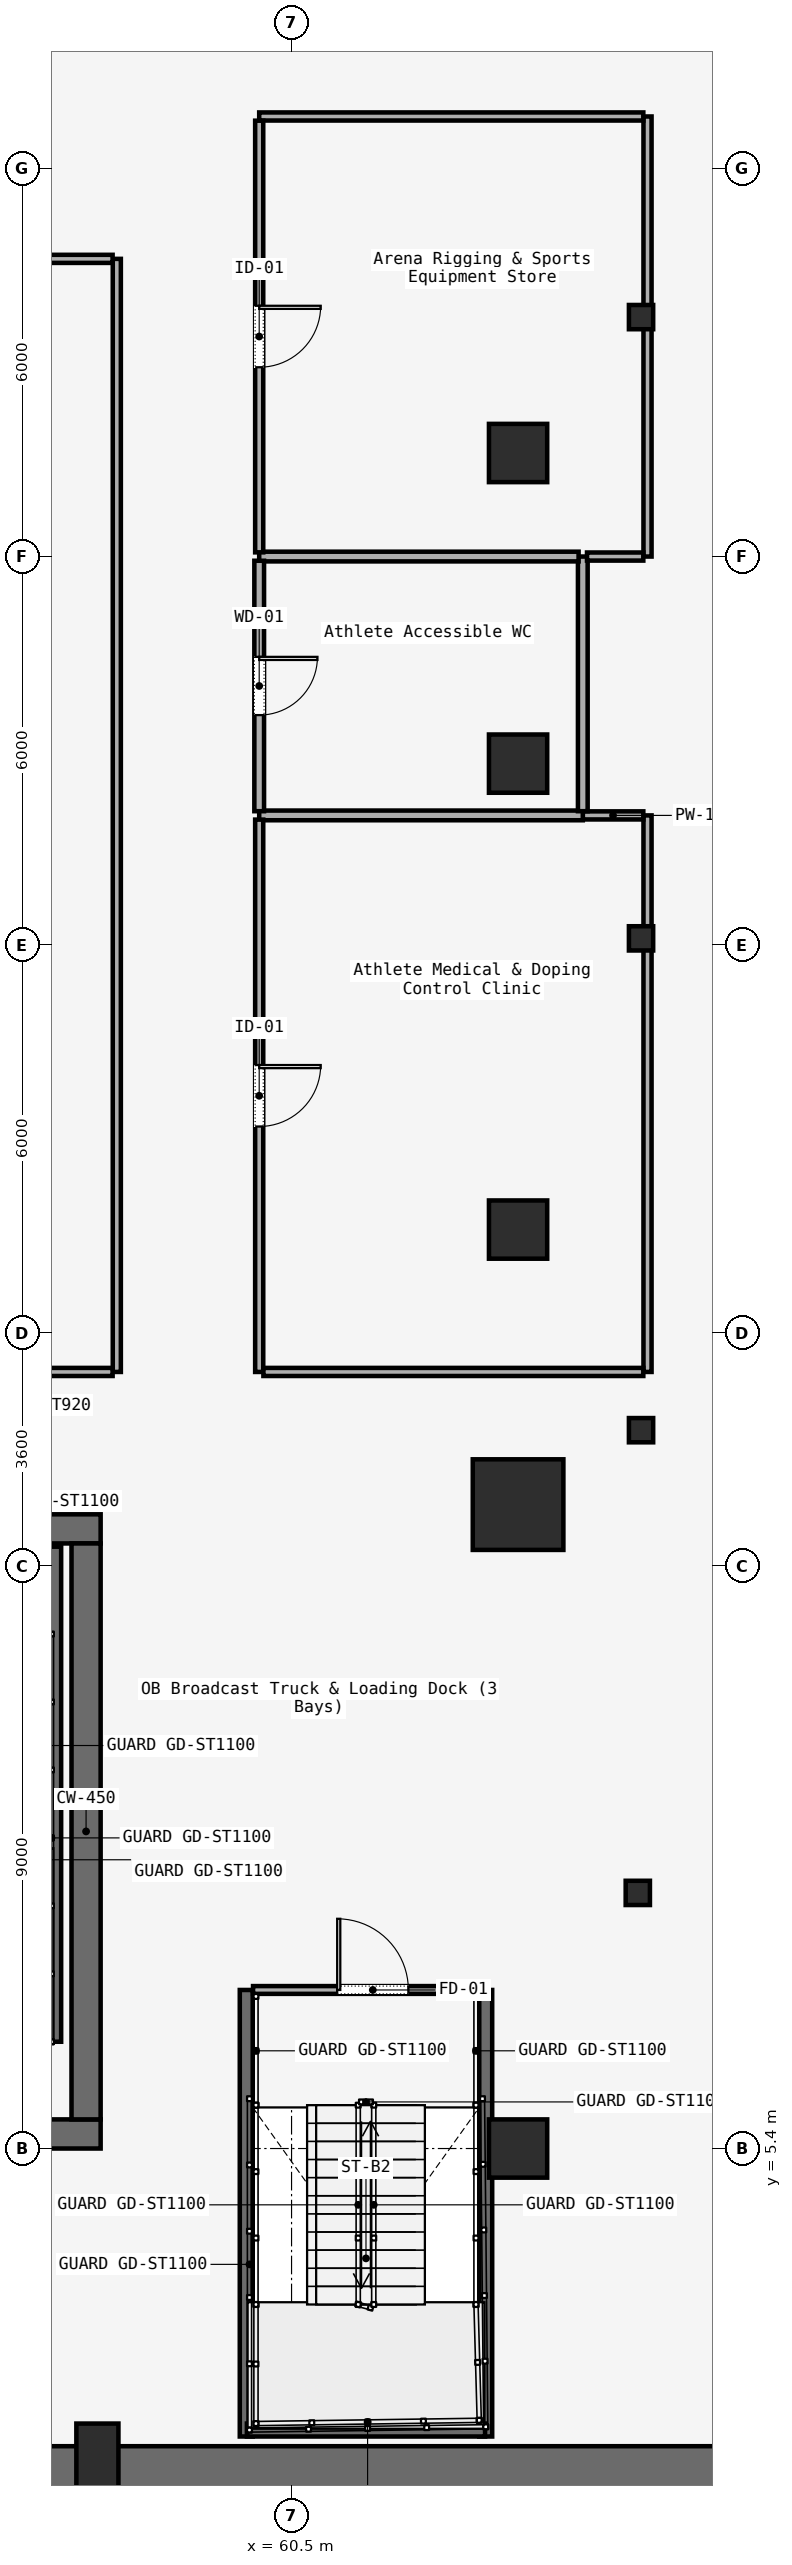
"""IFC4 building model, lengths in metres.
Left out: names, types, materials, properties, quantities, classifications, styles, units other than length and angle.
Written with IfcOpenShell. Run it as: python <this file> out.ifc"""

import sys

from ifc_helpers import new_model, si_unit, direction, frame, frame_2d, origin, origin_2d, place, context, subcontext, project, spatial, rectangle, i_section, extrude, element, fill, save


model = new_model("IFC4")
c1 = context("Model", 3, precision=1e-05, world=origin(), true_north=direction((0.0, 1.0)))
c2 = subcontext(c1, "Body", "Model", "MODEL_VIEW")
j1 = project(units=[si_unit("LENGTHUNIT", "METRE"), si_unit("PLANEANGLEUNIT", "RADIAN")], contexts=[c1])
p1 = place(None, origin())
s1 = spatial("IfcSite", under=j1, at=p1, CompositionType="ELEMENT")
p2 = place(p1, origin())
s2 = spatial("IfcBuilding", under=s1, at=p2, CompositionType="ELEMENT")
p3 = place(p2, frame((0.0, 0.0, -4.5)))
s3 = spatial("IfcBuildingStorey", under=s2, at=p3, CompositionType="ELEMENT", Elevation=-4.5)
p4 = place(p3, frame((0.0, 0.4, 0.0), z_axis=(0.0, 0.0, 1.0), x_axis=(1.0, 0.0, 0.0)))
e1 = element("IfcWall", 1, at=p4, inside=s3, PredefinedType="USERDEFINED", context=c2, shape_type="SweptSolid", body=[
    extrude(rectangle(XDim=84.0, YDim=0.8, at=frame_2d((42.0, 0.0))), origin(), (0.0, 0.0, 1.0), 4.1),
])
p5 = place(p3, frame((26.45, 14.975, 0.0), z_axis=(0.0, 0.0, 1.0), x_axis=(1.0, 0.0, 0.0)))
e2 = element("IfcWall", 2, at=p5, inside=s3, PredefinedType="SOLIDWALL", context=c2, shape_type="SweptSolid", body=[
    extrude(rectangle(XDim=31.1, YDim=0.45, at=frame_2d((15.55, 0.0))), origin(), (0.0, 0.0, 1.0), 4.1),
])
p6 = place(p5, frame((1.65, 0.0, 0.0)))
e3 = element("IfcOpeningElement", 3, at=p6, cuts=e2, PredefinedType="OPENING", context=c2, shape_type="SweptSolid", body=[
    extrude(rectangle(XDim=1.1, YDim=2.2, at=frame_2d((0.55, 1.1))), frame((0.0, 0.225, 0.0), z_axis=(0.0, -1.0, 0.0), x_axis=(1.0, 0.0, 0.0)), (0.0, 0.0, 1.0), 0.45),
])
p7 = place(p5, frame((13.65, 0.0, 0.0)))
e4 = element("IfcOpeningElement", 4, at=p7, cuts=e2, PredefinedType="OPENING", context=c2, shape_type="SweptSolid", body=[
    extrude(rectangle(XDim=1.1, YDim=2.2, at=frame_2d((0.55, 1.1))), frame((0.0, 0.225, 0.0), z_axis=(0.0, -1.0, 0.0), x_axis=(1.0, 0.0, 0.0)), (0.0, 0.0, 1.0), 0.45),
])
p8 = place(p5, frame((25.55, 0.0, 0.0)))
e5 = element("IfcOpeningElement", 5, at=p8, cuts=e2, PredefinedType="OPENING", context=c2, shape_type="SweptSolid", body=[
    extrude(rectangle(XDim=1.1, YDim=2.2, at=frame_2d((0.55, 1.1))), frame((0.0, 0.225, 0.0), z_axis=(0.0, -1.0, 0.0), x_axis=(1.0, 0.0, 0.0)), (0.0, 0.0, 1.0), 0.45),
])
p9 = place(p5, frame((10.7, 0.0, 0.0)))
e6 = element("IfcOpeningElement", 6, at=p9, cuts=e2, PredefinedType="OPENING", context=c2, shape_type="SweptSolid", body=[
    extrude(rectangle(XDim=1.4, YDim=2.2, at=frame_2d((0.7, 1.1))), frame((0.0, 0.225, 0.0), z_axis=(0.0, -1.0, 0.0), x_axis=(1.0, 0.0, 0.0)), (0.0, 0.0, 1.0), 0.45),
])
p10 = place(p5, frame((19.35, 0.0, 0.0)))
e7 = element("IfcOpeningElement", 7, at=p10, cuts=e2, PredefinedType="OPENING", context=c2, shape_type="SweptSolid", body=[
    extrude(rectangle(XDim=1.1, YDim=2.2, at=frame_2d((0.55, 1.1))), frame((0.0, 0.225, 0.0), z_axis=(0.0, -1.0, 0.0), x_axis=(1.0, 0.0, 0.0)), (0.0, 0.0, 1.0), 0.45),
])
p11 = place(p5, frame((21.4, 0.0, 0.0)))
e8 = element("IfcOpeningElement", 8, at=p11, cuts=e2, PredefinedType="OPENING", context=c2, shape_type="SweptSolid", body=[
    extrude(rectangle(XDim=0.9, YDim=2.1, at=frame_2d((0.45, 1.05))), frame((0.0, 0.225, 0.0), z_axis=(0.0, -1.0, 0.0), x_axis=(1.0, 0.0, 0.0)), (0.0, 0.0, 1.0), 0.45),
])
p12 = place(p5, frame((23.35, 0.0, 0.0)))
e9 = element("IfcOpeningElement", 9, at=p12, cuts=e2, PredefinedType="OPENING", context=c2, shape_type="SweptSolid", body=[
    extrude(rectangle(XDim=1.3, YDim=2.3, at=frame_2d((0.65, 1.15))), frame((0.0, 0.225, 0.0), z_axis=(0.0, -1.0, 0.0), x_axis=(1.0, 0.0, 0.0)), (0.0, 0.0, 1.0), 0.45),
])
p13 = place(p3, frame((26.45, 5.625, 0.0), z_axis=(0.0, 0.0, 1.0), x_axis=(1.0, 0.0, 0.0)))
e10 = element("IfcWall", 10, at=p13, inside=s3, PredefinedType="SOLIDWALL", context=c2, shape_type="SweptSolid", body=[
    extrude(rectangle(XDim=31.1, YDim=0.45, at=frame_2d((15.55, 0.0))), origin(), (0.0, 0.0, 1.0), 4.1),
])
p14 = place(p3, frame((57.325, 5.85, 0.0), z_axis=(0.0, 0.0, 1.0), x_axis=(0.0, 1.0, 0.0)))
e11 = element("IfcWall", 11, at=p14, inside=s3, PredefinedType="SOLIDWALL", context=c2, shape_type="SweptSolid", body=[
    extrude(rectangle(XDim=8.9, YDim=0.45, at=frame_2d((4.45, 0.0))), origin(), (0.0, 0.0, 1.0), 4.1),
])
p15 = place(p3, frame((64.0, 15.35, 0.0), z_axis=(0.0, 0.0, 1.0), x_axis=(1.0, 0.0, 0.0)))
e12 = element("IfcColumn", 12, at=p15, inside=s3, PredefinedType="COLUMN", context=c2, shape_type="SweptSolid", body=[
    extrude(rectangle(XDim=1.4, YDim=1.4, at=origin_2d()), origin(), (0.0, 0.0, 1.0), 4.1),
])
p16 = place(p3, frame((57.5, 0.55, 0.0), z_axis=(0.0, 0.0, 1.0), x_axis=(1.0, 0.0, 0.0)))
e13 = element("IfcColumn", 13, at=p16, inside=s3, PredefinedType="PILASTER", context=c2, shape_type="SweptSolid", body=[
    extrude(rectangle(XDim=0.65, YDim=1.2, at=origin_2d()), origin(), (0.0, 0.0, 1.0), 4.1),
])
for number, where, z_axis, x_axis in (
    (14, (64.0, 5.4, 0.0), (0.0, 0.0, 1.0), (1.0, 0.0, 0.0)),
    (15, (64.0, 19.6, 0.0), (0.0, 0.0, 1.0), (1.0, 0.0, 0.0)),
    (16, (64.0, 26.8, 0.0), (0.0, 0.0, 1.0), (1.0, 0.0, 0.0)),
    (17, (64.0, 31.6, 0.0), (0.0, 0.0, 1.0), (1.0, 0.0, 0.0)),
):
    element("IfcColumn", number, at=place(p3, frame(where, z_axis=z_axis, x_axis=x_axis)), inside=s3, PredefinedType="COLUMN", context=c2, shape_type="SweptSolid", body=[
        extrude(rectangle(XDim=0.9, YDim=0.9, at=origin_2d()), origin(), (0.0, 0.0, 1.0), 4.1),
    ])
for number, where, z_axis, x_axis in (
    (18, (65.85, 9.35, 0.0), (0.0, 0.0, 1.0), (1.0, 0.0, 0.0)),
    (19, (65.9, 16.5, 0.0), (0.0, 0.0, 1.0), (1.0, 0.0, 0.0)),
    (20, (65.9, 24.1, 0.0), (0.0, 0.0, 1.0), (1.0, 0.0, 0.0)),
    (21, (65.9, 33.7, 0.0), (0.0, 0.0, 1.0), (1.0, 0.0, 0.0)),
):
    element("IfcColumn", number, at=place(p3, frame(where, z_axis=z_axis, x_axis=x_axis)), inside=s3, PredefinedType="COLUMN", context=c2, shape_type="SweptSolid", body=[
        extrude(i_section(OverallWidth=0.375, OverallDepth=0.375, WebThickness=0.017, FlangeThickness=0.027, FilletRadius=0.015, at=origin_2d()), origin(), (0.0, 0.0, 1.0), 4.1),
    ])
p17 = place(p3, frame((56.84, 14.7, 0.0), z_axis=(0.0, 0.0, 1.0), x_axis=(0.0, -1.0, 0.0)))
e22 = element("IfcWall", 22, at=p17, inside=s3, PredefinedType="SOLIDWALL", context=c2, shape_type="SweptSolid", body=[
    extrude(rectangle(XDim=7.65, YDim=0.2, at=frame_2d((3.825, 0.0))), origin(), (0.0, 0.0, 1.0), 4.5),
])
for number, where, z_axis, x_axis in (
    (23, (59.8, 7.85, 0.0), (0.0, 0.0, 1.0), (0.0, -1.0, 0.0)),
    (24, (63.5, 7.85, 0.0), (0.0, 0.0, 1.0), (0.0, -1.0, 0.0)),
):
    element("IfcWall", number, at=place(p3, frame(where, z_axis=z_axis, x_axis=x_axis)), inside=s3, PredefinedType="SOLIDWALL", context=c2, shape_type="SweptSolid", body=[
        extrude(rectangle(XDim=6.9, YDim=0.2, at=frame_2d((3.45, 0.0))), origin(), (0.0, 0.0, 1.0), 4.5),
    ])
p18 = place(p3, frame((59.81, 1.05, 0.0), z_axis=(0.0, 0.0, 1.0), x_axis=(1.0, 0.0, 0.0)))
e25 = element("IfcWall", 25, at=p18, inside=s3, PredefinedType="SOLIDWALL", context=c2, shape_type="SweptSolid", body=[
    extrude(rectangle(XDim=3.68, YDim=0.2, at=frame_2d((1.84, 0.0))), origin(), (0.0, 0.0, 1.0), 4.5),
])
p19 = place(p3, frame((59.905, 7.85, 0.0), z_axis=(0.0, 0.0, 1.0), x_axis=(1.0, 0.0, 0.0)))
e26 = element("IfcWall", 26, at=p19, inside=s3, PredefinedType="SOLIDWALL", context=c2, shape_type="SweptSolid", body=[
    extrude(rectangle(XDim=3.49, YDim=0.12, at=frame_2d((1.745, 0.0))), origin(), (0.0, 0.0, 1.0), 3.143),
])
p20 = place(p19, frame((1.3, 0.0, 0.0)))
e27 = element("IfcOpeningElement", 27, at=p20, cuts=e26, PredefinedType="OPENING", context=c2, shape_type="SweptSolid", body=[
    extrude(rectangle(XDim=1.1, YDim=2.2, at=frame_2d((0.55, 1.1))), frame((0.0, 0.06, 0.0), z_axis=(0.0, -1.0, 0.0), x_axis=(1.0, 0.0, 0.0)), (0.0, 0.0, 1.0), 0.12),
])
p21 = place(p3, frame((57.8, 17.4, 0.0), z_axis=(0.0, 0.0, 1.0), x_axis=(0.0, 1.0, 0.0)))
e28 = element("IfcWall", 28, at=p21, inside=s3, PredefinedType="PARTITIONING", context=c2, shape_type="SweptSolid", body=[
    extrude(rectangle(XDim=17.2, YDim=0.125, at=frame_2d((8.6, 0.0))), origin(), (0.0, 0.0, 1.0), 3.143),
])
p22 = place(p3, frame((57.735, 34.6, 0.0), z_axis=(0.0, 0.0, 1.0), x_axis=(-1.0, 0.0, 0.0)))
e29 = element("IfcWall", 29, at=p22, inside=s3, PredefinedType="PARTITIONING", context=c2, shape_type="SweptSolid", body=[
    extrude(rectangle(XDim=31.535, YDim=0.125, at=frame_2d((15.768, 0.0))), origin(), (0.0, 0.0, 1.0), 3.143),
])
p23 = place(p22, frame((15.292, 0.0, 0.0)))
e30 = element("IfcOpeningElement", 30, at=p23, cuts=e29, PredefinedType="OPENING", context=c2, shape_type="SweptSolid", body=[
    extrude(rectangle(XDim=0.95, YDim=2.2, at=frame_2d((0.475, 1.1))), frame((0.0, 0.062, 0.0), z_axis=(0.0, -1.0, 0.0), x_axis=(1.0, 0.0, 0.0)), (0.0, 0.0, 1.0), 0.125),
])
p24 = place(p3, frame((26.265, 17.4, 0.0), z_axis=(0.0, 0.0, 1.0), x_axis=(1.0, 0.0, 0.0)))
e31 = element("IfcWall", 31, at=p24, inside=s3, PredefinedType="PARTITIONING", context=c2, shape_type="SweptSolid", body=[
    extrude(rectangle(XDim=31.47, YDim=0.125, at=frame_2d((15.735, 0.0))), origin(), (0.0, 0.0, 1.0), 3.143),
])
p25 = place(p3, frame((66.0, 17.4, 0.0), z_axis=(0.0, 0.0, 1.0), x_axis=(0.0, 1.0, 0.0)))
e32 = element("IfcWall", 32, at=p25, inside=s3, PredefinedType="PARTITIONING", context=c2, shape_type="SweptSolid", body=[
    extrude(rectangle(XDim=8.6, YDim=0.125, at=frame_2d((4.3, 0.0))), origin(), (0.0, 0.0, 1.0), 3.143),
])
p26 = place(p3, frame((65.935, 26.0, 0.0), z_axis=(0.0, 0.0, 1.0), x_axis=(-1.0, 0.0, 0.0)))
e33 = element("IfcWall", 33, at=p26, inside=s3, PredefinedType="PARTITIONING", context=c2, shape_type="SweptSolid", body=[
    extrude(rectangle(XDim=0.935, YDim=0.125, at=frame_2d((0.468, 0.0))), origin(), (0.0, 0.0, 1.0), 3.143),
])
p27 = place(p3, frame((65.0, 26.0, 0.0), z_axis=(0.0, 0.0, 1.0), x_axis=(-1.0, 0.0, 0.0)))
e34 = element("IfcWall", 34, at=p27, inside=s3, PredefinedType="PARTITIONING", context=c2, shape_type="SweptSolid", body=[
    extrude(rectangle(XDim=5.0, YDim=0.15, at=frame_2d((2.5, 0.0))), origin(), (0.0, 0.0, 1.0), 3.143),
])
p28 = place(p3, frame((60.0, 25.935, 0.0), z_axis=(0.0, 0.0, 1.0), x_axis=(0.0, -1.0, 0.0)))
e35 = element("IfcWall", 35, at=p28, inside=s3, PredefinedType="PARTITIONING", context=c2, shape_type="SweptSolid", body=[
    extrude(rectangle(XDim=8.535, YDim=0.125, at=frame_2d((4.268, 0.0))), origin(), (0.0, 0.0, 1.0), 3.143),
])
p29 = place(p28, frame((3.792, 0.0, 0.0)))
e36 = element("IfcOpeningElement", 36, at=p29, cuts=e35, PredefinedType="OPENING", context=c2, shape_type="SweptSolid", body=[
    extrude(rectangle(XDim=0.95, YDim=2.2, at=frame_2d((0.475, 1.1))), frame((0.0, 0.062, 0.0), z_axis=(0.0, -1.0, 0.0), x_axis=(1.0, 0.0, 0.0)), (0.0, 0.0, 1.0), 0.125),
])
p30 = place(p3, frame((60.065, 17.4, 0.0), z_axis=(0.0, 0.0, 1.0), x_axis=(1.0, 0.0, 0.0)))
e37 = element("IfcWall", 37, at=p30, inside=s3, PredefinedType="PARTITIONING", context=c2, shape_type="SweptSolid", body=[
    extrude(rectangle(XDim=5.87, YDim=0.125, at=frame_2d((2.935, 0.0))), origin(), (0.0, 0.0, 1.0), 3.143),
])
p31 = place(p3, frame((65.0, 26.065, 0.0), z_axis=(0.0, 0.0, 1.0), x_axis=(0.0, 1.0, 0.0)))
e38 = element("IfcWall", 38, at=p31, inside=s3, PredefinedType="PARTITIONING", context=c2, shape_type="SweptSolid", body=[
    extrude(rectangle(XDim=3.935, YDim=0.15, at=frame_2d((1.968, 0.0))), origin(), (0.0, 0.0, 1.0), 3.143),
])
p32 = place(p3, frame((64.935, 30.0, 0.0), z_axis=(0.0, 0.0, 1.0), x_axis=(-1.0, 0.0, 0.0)))
e39 = element("IfcWall", 39, at=p32, inside=s3, PredefinedType="PARTITIONING", context=c2, shape_type="SweptSolid", body=[
    extrude(rectangle(XDim=4.935, YDim=0.15, at=frame_2d((2.468, 0.0))), origin(), (0.0, 0.0, 1.0), 3.143),
])
p33 = place(p3, frame((60.0, 29.935, 0.0), z_axis=(0.0, 0.0, 1.0), x_axis=(0.0, -1.0, 0.0)))
e40 = element("IfcWall", 40, at=p33, inside=s3, PredefinedType="PARTITIONING", context=c2, shape_type="SweptSolid", body=[
    extrude(rectangle(XDim=3.87, YDim=0.15, at=frame_2d((1.935, 0.0))), origin(), (0.0, 0.0, 1.0), 3.143),
])
p34 = place(p33, frame((1.485, 0.0, 0.0)))
e41 = element("IfcOpeningElement", 41, at=p34, cuts=e40, PredefinedType="OPENING", context=c2, shape_type="SweptSolid", body=[
    extrude(rectangle(XDim=0.9, YDim=2.15, at=frame_2d((0.45, 1.075))), frame((0.0, 0.075, 0.0), z_axis=(0.0, -1.0, 0.0), x_axis=(1.0, 0.0, 0.0)), (0.0, 0.0, 1.0), 0.15),
])
p35 = place(p3, frame((66.0, 30.0, 0.0), z_axis=(0.0, 0.0, 1.0), x_axis=(0.0, 1.0, 0.0)))
e42 = element("IfcWall", 42, at=p35, inside=s3, PredefinedType="PARTITIONING", context=c2, shape_type="SweptSolid", body=[
    extrude(rectangle(XDim=6.8, YDim=0.125, at=frame_2d((3.4, 0.0))), origin(), (0.0, 0.0, 1.0), 3.143),
])
p36 = place(p3, frame((65.935, 36.8, 0.0), z_axis=(0.0, 0.0, 1.0), x_axis=(-1.0, 0.0, 0.0)))
e43 = element("IfcWall", 43, at=p36, inside=s3, PredefinedType="PARTITIONING", context=c2, shape_type="SweptSolid", body=[
    extrude(rectangle(XDim=5.935, YDim=0.125, at=frame_2d((2.968, 0.0))), origin(), (0.0, 0.0, 1.0), 3.143),
])
p37 = place(p3, frame((60.0, 36.735, 0.0), z_axis=(0.0, 0.0, 1.0), x_axis=(0.0, -1.0, 0.0)))
e44 = element("IfcWall", 44, at=p37, inside=s3, PredefinedType="PARTITIONING", context=c2, shape_type="SweptSolid", body=[
    extrude(rectangle(XDim=6.67, YDim=0.125, at=frame_2d((3.335, 0.0))), origin(), (0.0, 0.0, 1.0), 3.143),
])
p38 = place(p37, frame((2.86, 0.0, 0.0)))
e45 = element("IfcOpeningElement", 45, at=p38, cuts=e44, PredefinedType="OPENING", context=c2, shape_type="SweptSolid", body=[
    extrude(rectangle(XDim=0.95, YDim=2.2, at=frame_2d((0.475, 1.1))), frame((0.0, 0.062, 0.0), z_axis=(0.0, -1.0, 0.0), x_axis=(1.0, 0.0, 0.0)), (0.0, 0.0, 1.0), 0.125),
])
p39 = place(p3, frame((65.065, 30.0, 0.0), z_axis=(0.0, 0.0, 1.0), x_axis=(1.0, 0.0, 0.0)))
e46 = element("IfcWall", 46, at=p39, inside=s3, PredefinedType="PARTITIONING", context=c2, shape_type="SweptSolid", body=[
    extrude(rectangle(XDim=0.87, YDim=0.125, at=frame_2d((0.435, 0.0))), origin(), (0.0, 0.0, 1.0), 3.143),
])
p40 = place(p20, origin())
e47 = element("IfcDoor", 47, at=p40, inside=s3, OperationType="SINGLE_SWING_RIGHT", PredefinedType="DOOR", context=c2, shape_type="SweptSolid", body=[
    extrude(rectangle(XDim=1.1, YDim=2.2, at=frame_2d((0.55, 1.1))), frame((0.0, 0.025, 0.0), z_axis=(0.0, -1.0, 0.0), x_axis=(1.0, 0.0, 0.0)), (0.0, 0.0, 1.0), 0.05),
])
fill(e27, e47)
p41 = place(p29, origin())
e48 = element("IfcDoor", 48, at=p41, inside=s3, OperationType="SINGLE_SWING_RIGHT", PredefinedType="DOOR", context=c2, shape_type="SweptSolid", body=[
    extrude(rectangle(XDim=0.95, YDim=2.2, at=frame_2d((0.475, 1.1))), frame((0.0, 0.025, 0.0), z_axis=(0.0, -1.0, 0.0), x_axis=(1.0, 0.0, 0.0)), (0.0, 0.0, 1.0), 0.05),
])
fill(e36, e48)
p42 = place(p34, origin())
e49 = element("IfcDoor", 49, at=p42, inside=s3, OperationType="SINGLE_SWING_LEFT", PredefinedType="DOOR", context=c2, shape_type="SweptSolid", body=[
    extrude(rectangle(XDim=0.9, YDim=2.15, at=frame_2d((0.45, 1.075))), frame((0.0, 0.025, 0.0), z_axis=(0.0, -1.0, 0.0), x_axis=(1.0, 0.0, 0.0)), (0.0, 0.0, 1.0), 0.05),
])
fill(e41, e49)
p43 = place(p38, origin())
e50 = element("IfcDoor", 50, at=p43, inside=s3, OperationType="SINGLE_SWING_RIGHT", PredefinedType="DOOR", context=c2, shape_type="SweptSolid", body=[
    extrude(rectangle(XDim=0.95, YDim=2.2, at=frame_2d((0.475, 1.1))), frame((0.0, 0.025, 0.0), z_axis=(0.0, -1.0, 0.0), x_axis=(1.0, 0.0, 0.0)), (0.0, 0.0, 1.0), 0.05),
])
fill(e45, e50)
save(model, sys.argv[1])
